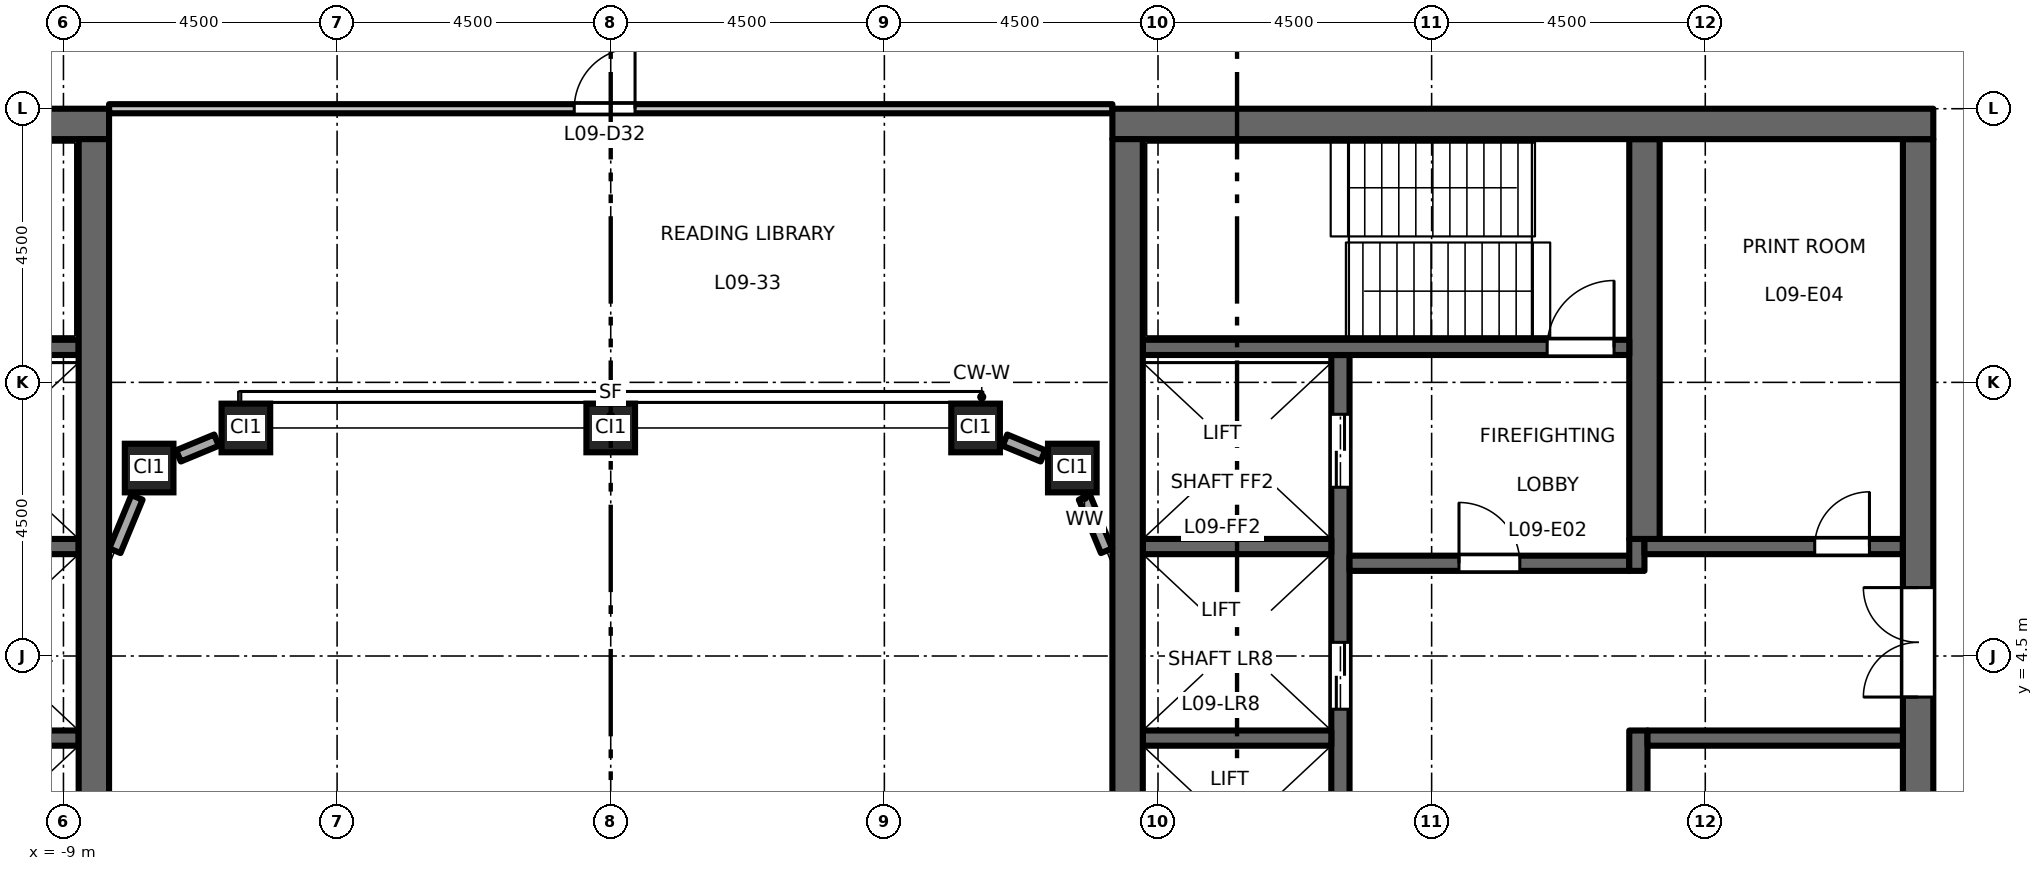
"""IFC4 building model, lengths in metres.
Left out: names, types, materials, properties, quantities, classifications, styles, units other than length and angle.
Written with IfcOpenShell. Run it as: python <this file> out.ifc"""

import sys

from ifc_helpers import new_model, si_unit, direction, frame, frame_2d, origin, origin_2d, place, context, subcontext, project, spatial, rectangle, hollow_rectangle, extrude, element, fill, save


model = new_model("IFC4")
c1 = context("Model", 3, precision=1e-05, world=origin(), true_north=direction((0.0, 1.0)))
c2 = subcontext(c1, "Body", "Model", "MODEL_VIEW")
j1 = project(units=[si_unit("LENGTHUNIT", "METRE"), si_unit("PLANEANGLEUNIT", "RADIAN")], contexts=[c1])
p1 = place(None, origin())
s1 = spatial("IfcSite", under=j1, at=p1, CompositionType="ELEMENT")
p2 = place(p1, origin())
s2 = spatial("IfcBuilding", under=s1, at=p2, CompositionType="ELEMENT")
p3 = place(p2, frame((0.0, 0.0, 44.7)))
s3 = spatial("IfcBuildingStorey", under=s2, at=p3, CompositionType="ELEMENT", Elevation=44.7)
for number, where, z_axis, x_axis in (
    (1, (-7.591, 7.591, 0.0), (0.0, 0.0, 1.0), (1.0, 0.0, 0.0)),
    (2, (-6.0, 8.25, 0.0), (0.0, 0.0, 1.0), (1.0, 0.0, 0.0)),
    (3, (0.0, 8.25, 0.0), (0.0, 0.0, 1.0), (1.0, 0.0, 0.0)),
    (4, (6.0, 8.25, 0.0), (0.0, 0.0, 1.0), (1.0, 0.0, 0.0)),
    (5, (7.591, 7.591, 0.0), (0.0, 0.0, 1.0), (1.0, 0.0, 0.0)),
):
    element("IfcColumn", number, at=place(p3, frame(where, z_axis=z_axis, x_axis=x_axis)), inside=s3, PredefinedType="COLUMN", context=c2, shape_type="SweptSolid", body=[
        extrude(hollow_rectangle(XDim=0.8, YDim=0.8, WallThickness=0.05, at=origin_2d()), origin(), (0.0, 0.0, 1.0), 4.5),
    ])
for number, where, z_axis, x_axis in (
    (6, (-8.75, 3.15, 0.0), (0.0, 0.0, 1.0), (-1.0, 0.0, 0.0)),
    (7, (-8.75, 6.3, 0.0), (0.0, 0.0, 1.0), (-1.0, 0.0, 0.0)),
):
    element("IfcWall", number, at=place(p3, frame(where, z_axis=z_axis, x_axis=x_axis)), inside=s3, PredefinedType="SHEAR", context=c2, shape_type="SweptSolid", body=[
        extrude(rectangle(XDim=3.1, YDim=0.25, at=frame_2d((1.55, 0.0))), origin(), (0.0, 0.0, 1.0), 4.35),
    ])
p4 = place(p3, frame((-8.75, 9.575, 0.0), z_axis=(0.0, 0.0, 1.0), x_axis=(-1.0, 0.0, 0.0)))
e8 = element("IfcWall", 8, at=p4, inside=s3, PredefinedType="SHEAR", context=c2, shape_type="SweptSolid", body=[
    extrude(rectangle(XDim=8.0, YDim=0.25, at=frame_2d((4.0, 0.0))), origin(), (0.0, 0.0, 1.0), 4.35),
])
p5 = place(p4, frame((6.65, 0.0, 0.0)))
e9 = element("IfcOpeningElement", 9, at=p5, cuts=e8, PredefinedType="OPENING", context=c2, shape_type="SweptSolid", body=[
    extrude(rectangle(XDim=1.1, YDim=2.1, at=frame_2d((0.55, 1.05))), frame((0.0, 0.135, 0.0), z_axis=(0.0, -1.0, 0.0), x_axis=(1.0, 0.0, 0.0)), (0.0, 0.0, 1.0), 0.27),
])
p6 = place(p3, frame((-8.25, 13.25, 0.0), z_axis=(0.0, 0.0, 1.0), x_axis=(-1.0, 0.0, 0.0)))
e10 = element("IfcWall", 10, at=p6, inside=s3, PredefinedType="SHEAR", context=c2, shape_type="SweptSolid", body=[
    extrude(rectangle(XDim=13.5, YDim=0.5, at=frame_2d((6.75, 0.0))), origin(), (0.0, 0.0, 1.0), 4.35),
])
p7 = place(p3, frame((-8.5, -13.0, 0.0), z_axis=(0.0, 0.0, 1.0), x_axis=(0.0, 1.0, 0.0)))
e11 = element("IfcWall", 11, at=p7, inside=s3, PredefinedType="SHEAR", context=c2, shape_type="SweptSolid", body=[
    extrude(rectangle(XDim=26.0, YDim=0.5, at=frame_2d((13.0, 0.0))), origin(), (0.0, 0.0, 1.0), 4.35),
])
p8 = place(p3, frame((12.0, -9.45, 0.0), z_axis=(0.0, 0.0, 1.0), x_axis=(0.0, 1.0, 0.0)))
e12 = element("IfcWall", 12, at=p8, inside=s3, PredefinedType="SHEAR", context=c2, shape_type="SweptSolid", body=[
    extrude(rectangle(XDim=18.9, YDim=0.3, at=frame_2d((9.45, 0.0))), origin(), (0.0, 0.0, 1.0), 4.35),
])
p9 = place(p8, frame((3.625, 0.0, 0.0)))
e13 = element("IfcOpeningElement", 13, at=p9, cuts=e12, PredefinedType="OPENING", context=c2, shape_type="SweptSolid", body=[
    extrude(rectangle(XDim=1.1, YDim=2.1, at=frame_2d((0.55, 1.05))), frame((0.0, 0.16, 0.0), z_axis=(0.0, -1.0, 0.0), x_axis=(1.0, 0.0, 0.0)), (0.0, 0.0, 1.0), 0.32),
])
p10 = place(p8, frame((6.775, 0.0, 0.0)))
e14 = element("IfcOpeningElement", 14, at=p10, cuts=e12, PredefinedType="OPENING", context=c2, shape_type="SweptSolid", body=[
    extrude(rectangle(XDim=1.1, YDim=2.1, at=frame_2d((0.55, 1.05))), frame((0.0, 0.16, 0.0), z_axis=(0.0, -1.0, 0.0), x_axis=(1.0, 0.0, 0.0)), (0.0, 0.0, 1.0), 0.32),
])
p11 = place(p8, frame((9.925, 0.0, 0.0)))
e15 = element("IfcOpeningElement", 15, at=p11, cuts=e12, PredefinedType="OPENING", context=c2, shape_type="SweptSolid", body=[
    extrude(rectangle(XDim=1.1, YDim=2.1, at=frame_2d((0.55, 1.05))), frame((0.0, 0.16, 0.0), z_axis=(0.0, -1.0, 0.0), x_axis=(1.0, 0.0, 0.0)), (0.0, 0.0, 1.0), 0.32),
])
p12 = place(p8, frame((13.075, 0.0, 0.0)))
e16 = element("IfcOpeningElement", 16, at=p12, cuts=e12, PredefinedType="OPENING", context=c2, shape_type="SweptSolid", body=[
    extrude(rectangle(XDim=1.1, YDim=2.1, at=frame_2d((0.55, 1.05))), frame((0.0, 0.16, 0.0), z_axis=(0.0, -1.0, 0.0), x_axis=(1.0, 0.0, 0.0)), (0.0, 0.0, 1.0), 0.32),
])
p13 = place(p8, frame((16.725, 0.0, 0.0)))
e17 = element("IfcOpeningElement", 17, at=p13, cuts=e12, PredefinedType="OPENING", context=c2, shape_type="SweptSolid", body=[
    extrude(rectangle(XDim=1.2, YDim=2.1, at=frame_2d((0.6, 1.05))), frame((0.0, 0.16, 0.0), z_axis=(0.0, -1.0, 0.0), x_axis=(1.0, 0.0, 0.0)), (0.0, 0.0, 1.0), 0.32),
])
p14 = place(p8, frame((0.975, 0.0, 0.0)))
e18 = element("IfcOpeningElement", 18, at=p14, cuts=e12, PredefinedType="OPENING", context=c2, shape_type="SweptSolid", body=[
    extrude(rectangle(XDim=1.2, YDim=2.1, at=frame_2d((0.6, 1.05))), frame((0.0, 0.16, 0.0), z_axis=(0.0, -1.0, 0.0), x_axis=(1.0, 0.0, 0.0)), (0.0, 0.0, 1.0), 0.32),
])
p15 = place(p3, frame((12.15, 6.025, 0.0), z_axis=(0.0, 0.0, 1.0), x_axis=(1.0, 0.0, 0.0)))
e19 = element("IfcWall", 19, at=p15, inside=s3, PredefinedType="SHEAR", context=c2, shape_type="SweptSolid", body=[
    extrude(rectangle(XDim=4.6, YDim=0.25, at=frame_2d((2.3, 0.0))), origin(), (0.0, 0.0, 1.0), 4.35),
])
p16 = place(p15, frame((1.8, 0.0, 0.0)))
e20 = element("IfcOpeningElement", 20, at=p16, cuts=e19, PredefinedType="OPENING", context=c2, shape_type="SweptSolid", body=[
    extrude(rectangle(XDim=1.0, YDim=2.1, at=frame_2d((0.5, 1.05))), frame((0.0, 0.135, 0.0), z_axis=(0.0, -1.0, 0.0), x_axis=(1.0, 0.0, 0.0)), (0.0, 0.0, 1.0), 0.27),
])
p17 = place(p3, frame((16.875, 5.9, 0.0), z_axis=(0.0, 0.0, 1.0), x_axis=(0.0, 1.0, 0.0)))
e21 = element("IfcWall", 21, at=p17, inside=s3, PredefinedType="SHEAR", context=c2, shape_type="SweptSolid", body=[
    extrude(rectangle(XDim=0.525, YDim=0.25, at=frame_2d((0.263, 0.0))), origin(), (0.0, 0.0, 1.0), 4.35),
])
p18 = place(p3, frame((17.0, 6.3, 0.0), z_axis=(0.0, 0.0, 1.0), x_axis=(1.0, 0.0, 0.0)))
e22 = element("IfcWall", 22, at=p18, inside=s3, PredefinedType="SHEAR", context=c2, shape_type="SweptSolid", body=[
    extrude(rectangle(XDim=4.25, YDim=0.25, at=frame_2d((2.125, 0.0))), origin(), (0.0, 0.0, 1.0), 4.35),
])
p19 = place(p18, frame((2.8, 0.0, 0.0)))
e23 = element("IfcOpeningElement", 23, at=p19, cuts=e22, PredefinedType="OPENING", context=c2, shape_type="SweptSolid", body=[
    extrude(rectangle(XDim=0.9, YDim=2.1, at=frame_2d((0.45, 1.05))), frame((0.0, 0.135, 0.0), z_axis=(0.0, -1.0, 0.0), x_axis=(1.0, 0.0, 0.0)), (0.0, 0.0, 1.0), 0.27),
])
p20 = place(p3, frame((21.5, -13.0, 0.0), z_axis=(0.0, 0.0, 1.0), x_axis=(0.0, 1.0, 0.0)))
e24 = element("IfcWall", 24, at=p20, inside=s3, PredefinedType="SHEAR", context=c2, shape_type="SweptSolid", body=[
    extrude(rectangle(XDim=26.0, YDim=0.5, at=frame_2d((13.0, 0.0))), origin(), (0.0, 0.0, 1.0), 4.35),
])
p21 = place(p20, frame((16.825, 0.0, 0.0)))
e25 = element("IfcOpeningElement", 25, at=p21, cuts=e24, PredefinedType="OPENING", context=c2, shape_type="SweptSolid", body=[
    extrude(rectangle(XDim=1.8, YDim=2.1, at=frame_2d((0.9, 1.05))), frame((0.0, 0.26, 0.0), z_axis=(0.0, -1.0, 0.0), x_axis=(1.0, 0.0, 0.0)), (0.0, 0.0, 1.0), 0.52),
])
p22 = place(p20, frame((7.375, 0.0, 0.0)))
e26 = element("IfcOpeningElement", 26, at=p22, cuts=e24, PredefinedType="OPENING", context=c2, shape_type="SweptSolid", body=[
    extrude(rectangle(XDim=1.8, YDim=2.1, at=frame_2d((0.9, 1.05))), frame((0.0, 0.26, 0.0), z_axis=(0.0, -1.0, 0.0), x_axis=(1.0, 0.0, 0.0)), (0.0, 0.0, 1.0), 0.52),
])
p23 = place(p20, frame((1.3, 0.0, 0.0)))
e27 = element("IfcOpeningElement", 27, at=p23, cuts=e24, PredefinedType="OPENING", context=c2, shape_type="SweptSolid", body=[
    extrude(rectangle(XDim=0.9, YDim=2.1, at=frame_2d((0.45, 1.05))), frame((0.0, 0.26, 0.0), z_axis=(0.0, -1.0, 0.0), x_axis=(1.0, 0.0, 0.0)), (0.0, 0.0, 1.0), 0.52),
])
p24 = place(p3, frame((16.9, -3.275, 0.0), z_axis=(0.0, 0.0, 1.0), x_axis=(0.0, 1.0, 0.0)))
e28 = element("IfcWall", 28, at=p24, inside=s3, PredefinedType="SHEAR", context=c2, shape_type="SweptSolid", body=[
    extrude(rectangle(XDim=6.55, YDim=0.3, at=frame_2d((3.275, 0.0))), origin(), (0.0, 0.0, 1.0), 4.35),
])
p25 = place(p3, frame((17.05, 3.15, 0.0), z_axis=(0.0, 0.0, 1.0), x_axis=(1.0, 0.0, 0.0)))
e29 = element("IfcWall", 29, at=p25, inside=s3, PredefinedType="SHEAR", context=c2, shape_type="SweptSolid", body=[
    extrude(rectangle(XDim=4.2, YDim=0.25, at=frame_2d((2.1, 0.0))), origin(), (0.0, 0.0, 1.0), 4.35),
])
p26 = place(p3, frame((17.0, 6.425, 0.0), z_axis=(0.0, 0.0, 1.0), x_axis=(0.0, 1.0, 0.0)))
e30 = element("IfcWall", 30, at=p26, inside=s3, PredefinedType="SHEAR", context=c2, shape_type="SweptSolid", body=[
    extrude(rectangle(XDim=6.575, YDim=0.5, at=frame_2d((3.288, 0.0))), origin(), (0.0, 0.0, 1.0), 4.35),
])
for number, where, z_axis, x_axis in (
    (31, (8.75, 3.15, 0.0), (0.0, 0.0, 1.0), (1.0, 0.0, 0.0)),
    (32, (8.75, 6.3, 0.0), (0.0, 0.0, 1.0), (1.0, 0.0, 0.0)),
):
    element("IfcWall", number, at=place(p3, frame(where, z_axis=z_axis, x_axis=x_axis)), inside=s3, PredefinedType="SHEAR", context=c2, shape_type="SweptSolid", body=[
        extrude(rectangle(XDim=3.1, YDim=0.25, at=frame_2d((1.55, 0.0))), origin(), (0.0, 0.0, 1.0), 4.35),
    ])
p27 = place(p3, frame((8.75, 9.575, 0.0), z_axis=(0.0, 0.0, 1.0), x_axis=(1.0, 0.0, 0.0)))
e33 = element("IfcWall", 33, at=p27, inside=s3, PredefinedType="SHEAR", context=c2, shape_type="SweptSolid", body=[
    extrude(rectangle(XDim=8.0, YDim=0.25, at=frame_2d((4.0, 0.0))), origin(), (0.0, 0.0, 1.0), 4.35),
])
p28 = place(p27, frame((6.65, 0.0, 0.0)))
e34 = element("IfcOpeningElement", 34, at=p28, cuts=e33, PredefinedType="OPENING", context=c2, shape_type="SweptSolid", body=[
    extrude(rectangle(XDim=1.1, YDim=2.1, at=frame_2d((0.55, 1.05))), frame((0.0, 0.135, 0.0), z_axis=(0.0, -1.0, 0.0), x_axis=(1.0, 0.0, 0.0)), (0.0, 0.0, 1.0), 0.27),
])
p29 = place(p3, frame((8.25, 13.25, 0.0), z_axis=(0.0, 0.0, 1.0), x_axis=(1.0, 0.0, 0.0)))
e35 = element("IfcWall", 35, at=p29, inside=s3, PredefinedType="SHEAR", context=c2, shape_type="SweptSolid", body=[
    extrude(rectangle(XDim=13.5, YDim=0.5, at=frame_2d((6.75, 0.0))), origin(), (0.0, 0.0, 1.0), 4.35),
])
p30 = place(p3, frame((8.5, -13.0, 0.0), z_axis=(0.0, 0.0, 1.0), x_axis=(0.0, 1.0, 0.0)))
e36 = element("IfcWall", 36, at=p30, inside=s3, PredefinedType="SHEAR", context=c2, shape_type="SweptSolid", body=[
    extrude(rectangle(XDim=26.0, YDim=0.5, at=frame_2d((13.0, 0.0))), origin(), (0.0, 0.0, 1.0), 4.35),
])
p31 = place(p3, frame((8.154, 6.231, 0.0), z_axis=(0.0, 0.0, 1.0), x_axis=(-0.382624318388, 0.923904016107, 0.0)))
e37 = element("IfcWall", 37, at=p31, inside=s3, PredefinedType="STANDARD", context=c2, shape_type="SweptSolid", body=[
    extrude(rectangle(XDim=0.949, YDim=0.2, at=frame_2d((0.475, 0.0))), origin(), (0.0, 0.0, 1.0), 3.73),
])
for number, where, z_axis, x_axis in (
    (38, (7.108, 7.791, 0.0), (0.0, 0.0, 1.0), (-0.924, 0.383, 0.0)),
    (39, (-6.483, 8.05, 0.0), (0.0, 0.0, 1.0), (-0.924, -0.383, 0.0)),
):
    element("IfcWall", number, at=place(p3, frame(where, z_axis=z_axis, x_axis=x_axis)), inside=s3, PredefinedType="STANDARD", context=c2, shape_type="SweptSolid", body=[
        extrude(rectangle(XDim=0.677, YDim=0.2, at=frame_2d((0.338, 0.0))), origin(), (0.0, 0.0, 1.0), 3.73),
    ])
p32 = place(p3, frame((-7.791, 7.108, 0.0), z_axis=(0.0, 0.0, 1.0), x_axis=(-0.382624318388, -0.923904016107, 0.0)))
e40 = element("IfcWall", 40, at=p32, inside=s3, PredefinedType="STANDARD", context=c2, shape_type="SweptSolid", body=[
    extrude(rectangle(XDim=0.949, YDim=0.2, at=frame_2d((0.475, 0.0))), origin(), (0.0, 0.0, 1.0), 3.73),
])
p33 = place(p3, frame((-8.25, 13.5, 0.0), z_axis=(0.0, 0.0, 1.0), x_axis=(1.0, 0.0, 0.0)))
e41 = element("IfcWall", 41, at=p33, inside=s3, PredefinedType="PARTITIONING", context=c2, shape_type="SweptSolid", body=[
    extrude(rectangle(XDim=16.5, YDim=0.15, at=frame_2d((8.25, 0.0))), origin(), (0.0, 0.0, 1.0), 3.85),
])
p34 = place(p33, frame((7.65, 0.0, 0.0)))
e42 = element("IfcOpeningElement", 42, at=p34, cuts=e41, PredefinedType="OPENING", context=c2, shape_type="SweptSolid", body=[
    extrude(rectangle(XDim=1.0, YDim=2.1, at=frame_2d((0.5, 1.05))), frame((0.0, 0.085, 0.0), z_axis=(0.0, -1.0, 0.0), x_axis=(1.0, 0.0, 0.0)), (0.0, 0.0, 1.0), 0.17),
])
p35 = place(p16, origin())
e43 = element("IfcDoor", 43, at=p35, inside=s3, OperationType="SINGLE_SWING_RIGHT", PredefinedType="DOOR", context=c2, shape_type="SweptSolid", body=[
    extrude(rectangle(XDim=1.0, YDim=2.1, at=frame_2d((0.5, 1.05))), frame((0.0, 0.025, 0.0), z_axis=(0.0, -1.0, 0.0), x_axis=(1.0, 0.0, 0.0)), (0.0, 0.0, 1.0), 0.05),
])
fill(e20, e43)
p36 = place(p28, origin())
e44 = element("IfcDoor", 44, at=p36, inside=s3, OperationType="SINGLE_SWING_LEFT", PredefinedType="DOOR", context=c2, shape_type="SweptSolid", body=[
    extrude(rectangle(XDim=1.1, YDim=2.1, at=frame_2d((0.55, 1.05))), frame((0.0, 0.025, 0.0), z_axis=(0.0, -1.0, 0.0), x_axis=(1.0, 0.0, 0.0)), (0.0, 0.0, 1.0), 0.05),
])
fill(e34, e44)
p37 = place(p21, origin())
e45 = element("IfcDoor", 45, at=p37, inside=s3, OperationType="DOUBLE_DOOR_DOUBLE_SWING", PredefinedType="DOOR", context=c2, shape_type="SweptSolid", body=[
    extrude(rectangle(XDim=1.8, YDim=2.1, at=frame_2d((0.9, 1.05))), frame((0.0, 0.025, 0.0), z_axis=(0.0, -1.0, 0.0), x_axis=(1.0, 0.0, 0.0)), (0.0, 0.0, 1.0), 0.05),
])
fill(e25, e45)
p38 = place(p12, origin())
e46 = element("IfcDoor", 46, at=p38, inside=s3, OperationType="DOUBLE_DOOR_SLIDING", PredefinedType="DOOR", context=c2, shape_type="SweptSolid", body=[
    extrude(rectangle(XDim=1.1, YDim=2.1, at=frame_2d((0.55, 1.05))), frame((0.0, 0.025, 0.0), z_axis=(0.0, -1.0, 0.0), x_axis=(1.0, 0.0, 0.0)), (0.0, 0.0, 1.0), 0.05),
])
fill(e16, e46)
p39 = place(p13, origin())
e47 = element("IfcDoor", 47, at=p39, inside=s3, OperationType="DOUBLE_DOOR_SLIDING", PredefinedType="DOOR", context=c2, shape_type="SweptSolid", body=[
    extrude(rectangle(XDim=1.2, YDim=2.1, at=frame_2d((0.6, 1.05))), frame((0.0, 0.025, 0.0), z_axis=(0.0, -1.0, 0.0), x_axis=(1.0, 0.0, 0.0)), (0.0, 0.0, 1.0), 0.05),
])
fill(e17, e47)
p40 = place(p19, origin())
e48 = element("IfcDoor", 48, at=p40, inside=s3, OperationType="SINGLE_SWING_LEFT", PredefinedType="DOOR", context=c2, shape_type="SweptSolid", body=[
    extrude(rectangle(XDim=0.9, YDim=2.1, at=frame_2d((0.45, 1.05))), frame((0.0, 0.025, 0.0), z_axis=(0.0, -1.0, 0.0), x_axis=(1.0, 0.0, 0.0)), (0.0, 0.0, 1.0), 0.05),
])
fill(e23, e48)
p41 = place(p34, origin())
e49 = element("IfcDoor", 49, at=p41, inside=s3, OperationType="SINGLE_SWING_RIGHT", PredefinedType="DOOR", context=c2, shape_type="SweptSolid", body=[
    extrude(rectangle(XDim=1.0, YDim=2.1, at=frame_2d((0.5, 1.05))), frame((0.0, 0.025, 0.0), z_axis=(0.0, -1.0, 0.0), x_axis=(1.0, 0.0, 0.0)), (0.0, 0.0, 1.0), 0.05),
])
fill(e42, e49)
save(model, sys.argv[1])
